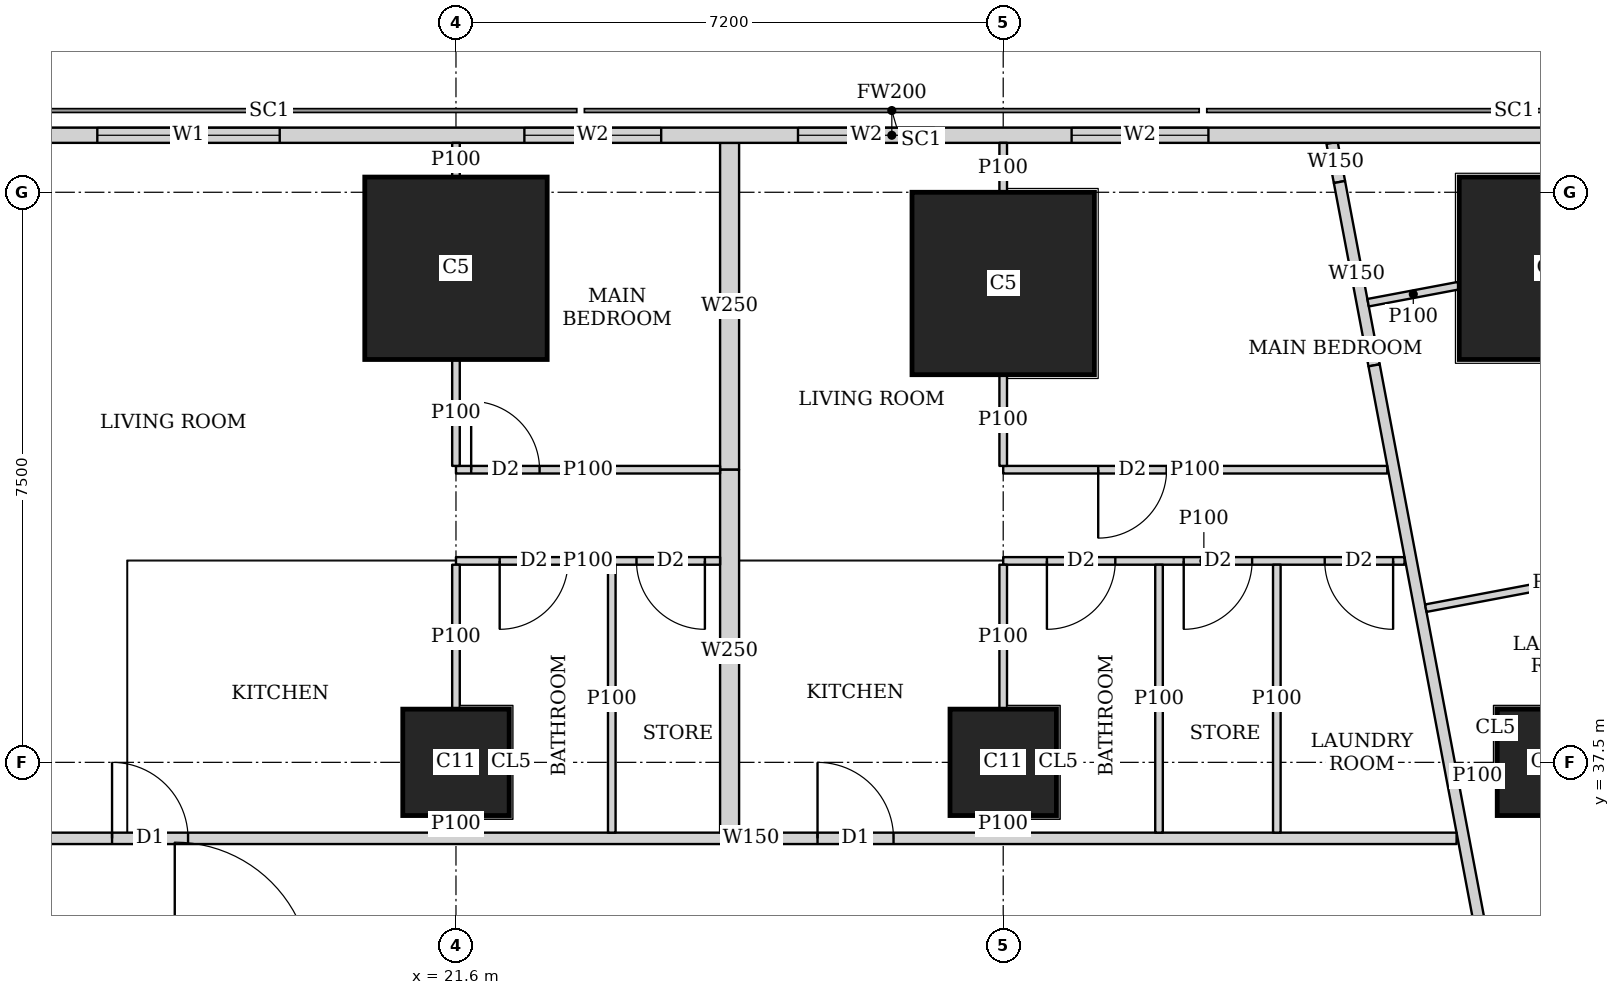
"""IFC4 building model, lengths in metres.
Left out: names, types, materials, properties, quantities, classifications, styles, units other than length and angle.
Written with IfcOpenShell. Run it as: python <this file> out.ifc"""

import sys

from ifc_helpers import new_model, si_unit, direction, frame, frame_2d, origin, origin_2d, place, context, subcontext, project, spatial, rectangle, extrude, element, fill, save


model = new_model("IFC4")
c1 = context("Model", 3, precision=1e-05, world=origin(), true_north=direction((0.0, 1.0)))
c2 = subcontext(c1, "Body", "Model", "MODEL_VIEW")
j1 = project(units=[si_unit("LENGTHUNIT", "METRE"), si_unit("PLANEANGLEUNIT", "RADIAN")], contexts=[c1])
p1 = place(None, origin())
s1 = spatial("IfcSite", under=j1, at=p1, CompositionType="ELEMENT")
p2 = place(p1, origin())
s2 = spatial("IfcBuilding", under=s1, at=p2, CompositionType="ELEMENT")
p3 = place(p2, frame((0.0, 0.0, 227.45)))
s3 = spatial("IfcBuildingStorey", under=s2, at=p3, CompositionType="ELEMENT", Elevation=227.45)
for number, where, z_axis, x_axis in (
    (1, (21.6, 37.5, 0.0), (0.0, 0.0, 1.0), (1.0, 0.0, 0.0)),
    (2, (28.8, 37.5, 0.0), (0.0, 0.0, 1.0), (1.0, 0.0, 0.0)),
    (3, (36.0, 37.5, 0.0), (0.0, 0.0, 1.0), (1.0, 0.0, 0.0)),
):
    element("IfcColumn", number, at=place(p3, frame(where, z_axis=z_axis, x_axis=x_axis)), inside=s3, PredefinedType="COLUMN", context=c2, shape_type="SweptSolid", body=[
        extrude(rectangle(XDim=1.4, YDim=1.4, at=origin_2d()), origin(), (0.0, 0.0, 1.0), 3.75),
    ])
for number, where, z_axis, x_axis in (
    (4, (21.6, 44.0, 0.0), (0.0, 0.0, 1.0), (1.0, 0.0, 0.0)),
    (5, (28.8, 43.8, 0.0), (0.0, 0.0, 1.0), (1.0, 0.0, 0.0)),
    (6, (36.0, 44.0, 0.0), (0.0, 0.0, 1.0), (1.0, 0.0, 0.0)),
):
    element("IfcColumn", number, at=place(p3, frame(where, z_axis=z_axis, x_axis=x_axis)), inside=s3, PredefinedType="COLUMN", context=c2, shape_type="SweptSolid", body=[
        extrude(rectangle(XDim=2.4, YDim=2.4, at=origin_2d()), origin(), (0.0, 0.0, 1.0), 3.75),
    ])
p4 = place(p3, frame((40.106, 45.75, 0.0), z_axis=(0.0, 0.0, 1.0), x_axis=(-1.0, 0.0, 0.0)))
e7 = element("IfcWall", 7, at=p4, inside=s3, PredefinedType="SOLIDWALL", context=c2, shape_type="SweptSolid", body=[
    extrude(rectangle(XDim=25.543, YDim=0.2, at=frame_2d((12.771, 0.0))), origin(), (0.0, 0.0, 1.0), 3.5),
])
p5 = place(p4, frame((8.606, 0.0, 0.9)))
e8 = element("IfcOpeningElement", 8, at=p5, cuts=e7, PredefinedType="OPENING", context=c2, shape_type="SweptSolid", body=[
    extrude(rectangle(XDim=1.8, YDim=1.5, at=frame_2d((0.9, 0.75))), frame((0.0, 0.11, 0.0), z_axis=(0.0, -1.0, 0.0), x_axis=(1.0, 0.0, 0.0)), (0.0, 0.0, 1.0), 0.22),
])
p6 = place(p4, frame((12.206, 0.0, 0.9)))
e9 = element("IfcOpeningElement", 9, at=p6, cuts=e7, PredefinedType="OPENING", context=c2, shape_type="SweptSolid", body=[
    extrude(rectangle(XDim=1.8, YDim=1.5, at=frame_2d((0.9, 0.75))), frame((0.0, 0.11, 0.0), z_axis=(0.0, -1.0, 0.0), x_axis=(1.0, 0.0, 0.0)), (0.0, 0.0, 1.0), 0.22),
])
p7 = place(p4, frame((15.806, 0.0, 0.9)))
e10 = element("IfcOpeningElement", 10, at=p7, cuts=e7, PredefinedType="OPENING", context=c2, shape_type="SweptSolid", body=[
    extrude(rectangle(XDim=1.8, YDim=1.5, at=frame_2d((0.9, 0.75))), frame((0.0, 0.11, 0.0), z_axis=(0.0, -1.0, 0.0), x_axis=(1.0, 0.0, 0.0)), (0.0, 0.0, 1.0), 0.22),
])
p8 = place(p4, frame((20.825, 0.0, 0.9)))
e11 = element("IfcOpeningElement", 11, at=p8, cuts=e7, PredefinedType="OPENING", context=c2, shape_type="SweptSolid", body=[
    extrude(rectangle(XDim=2.4, YDim=1.5, at=frame_2d((1.2, 0.75))), frame((0.0, 0.11, 0.0), z_axis=(0.0, -1.0, 0.0), x_axis=(1.0, 0.0, 0.0)), (0.0, 0.0, 1.0), 0.22),
])
p9 = place(p3, frame((16.201, 36.5, 0.0), z_axis=(0.0, 0.0, 1.0), x_axis=(1.0, 0.0, 0.0)))
e12 = element("IfcWall", 12, at=p9, inside=s3, PredefinedType="SOLIDWALL", context=c2, shape_type="SweptSolid", body=[
    extrude(rectangle(XDim=18.564, YDim=0.15, at=frame_2d((9.282, 0.0))), origin(), (0.0, 0.0, 1.0), 3.5),
])
p10 = place(p9, frame((0.874, 0.0, 0.0)))
e13 = element("IfcOpeningElement", 13, at=p10, cuts=e12, PredefinedType="OPENING", context=c2, shape_type="SweptSolid", body=[
    extrude(rectangle(XDim=1.0, YDim=2.1, at=frame_2d((0.5, 1.05))), frame((0.0, 0.085, 0.0), z_axis=(0.0, -1.0, 0.0), x_axis=(1.0, 0.0, 0.0)), (0.0, 0.0, 1.0), 0.17),
])
p11 = place(p9, frame((10.156, 0.0, 0.0)))
e14 = element("IfcOpeningElement", 14, at=p11, cuts=e12, PredefinedType="OPENING", context=c2, shape_type="SweptSolid", body=[
    extrude(rectangle(XDim=1.0, YDim=2.1, at=frame_2d((0.5, 1.05))), frame((0.0, 0.085, 0.0), z_axis=(0.0, -1.0, 0.0), x_axis=(1.0, 0.0, 0.0)), (0.0, 0.0, 1.0), 0.17),
])
p12 = place(p3, frame((33.127, 45.65, 0.0), z_axis=(0.0, 0.0, 1.0), x_axis=(0.185441815104, -0.982655246366, 0.0)))
e15 = element("IfcWall", 15, at=p12, inside=s3, PredefinedType="SOLIDWALL", context=c2, shape_type="SweptSolid", body=[
    extrude(rectangle(XDim=0.524, YDim=0.15, at=frame_2d((0.262, 0.0))), origin(), (0.0, 0.0, 1.0), 3.5),
])
p13 = place(p3, frame((33.224, 45.135, 0.0), z_axis=(0.0, 0.0, 1.0), x_axis=(0.185681462868, -0.982609990967, 0.0)))
e16 = element("IfcWall", 16, at=p13, inside=s3, PredefinedType="SOLIDWALL", context=c2, shape_type="SweptSolid", body=[
    extrude(rectangle(XDim=2.455, YDim=0.15, at=frame_2d((1.228, 0.0))), origin(), (0.0, 0.0, 1.0), 2.05),
])
p14 = place(p3, frame((33.68, 42.723, 0.0), z_axis=(0.0, 0.0, 1.0), x_axis=(0.185601160014, -0.982625162207, 0.0)))
e17 = element("IfcWall", 17, at=p14, inside=s3, PredefinedType="SOLIDWALL", context=c2, shape_type="SweptSolid", body=[
    extrude(rectangle(XDim=41.051, YDim=0.15, at=frame_2d((20.526, 0.0))), origin(), (0.0, 0.0, 1.0), 2.5),
])
p15 = place(p14, frame((16.123, 0.0, 0.0)))
e18 = element("IfcOpeningElement", 18, at=p15, cuts=e17, PredefinedType="OPENING", context=c2, shape_type="SweptSolid", body=[
    extrude(rectangle(XDim=1.0, YDim=2.1, at=frame_2d((0.5, 1.05))), frame((0.0, 0.085, 0.0), z_axis=(0.0, -1.0, 0.0), x_axis=(1.0, 0.0, 0.0)), (0.0, 0.0, 1.0), 0.17),
])
p16 = place(p14, frame((19.938, 0.0, 0.0)))
e19 = element("IfcOpeningElement", 19, at=p16, cuts=e17, PredefinedType="OPENING", context=c2, shape_type="SweptSolid", body=[
    extrude(rectangle(XDim=1.0, YDim=2.1, at=frame_2d((0.5, 1.05))), frame((0.0, 0.085, 0.0), z_axis=(0.0, -1.0, 0.0), x_axis=(1.0, 0.0, 0.0)), (0.0, 0.0, 1.0), 0.17),
])
p17 = place(p14, frame((30.902, 0.0, 0.0)))
e20 = element("IfcOpeningElement", 20, at=p17, cuts=e17, PredefinedType="OPENING", context=c2, shape_type="SweptSolid", body=[
    extrude(rectangle(XDim=1.0, YDim=2.1, at=frame_2d((0.5, 1.05))), frame((0.0, 0.085, 0.0), z_axis=(0.0, -1.0, 0.0), x_axis=(1.0, 0.0, 0.0)), (0.0, 0.0, 1.0), 0.17),
])
p18 = place(p3, frame((34.79, 43.771, 0.0), z_axis=(0.0, 0.0, 1.0), x_axis=(-0.982730261052, -0.18504387051, 0.0)))
e21 = element("IfcWall", 21, at=p18, inside=s3, PredefinedType="PARTITIONING", context=c2, shape_type="SweptSolid", body=[
    extrude(rectangle(XDim=1.21, YDim=0.1, at=frame_2d((0.605, 0.0))), origin(), (0.0, 0.0, 1.0), 2.05),
])
p19 = place(p3, frame((37.824, 40.182, 0.0), z_axis=(0.0, 0.0, 1.0), x_axis=(-0.982648794755, -0.185475998897, 0.0)))
e22 = element("IfcWall", 22, at=p19, inside=s3, PredefinedType="PARTITIONING", context=c2, shape_type="SweptSolid", body=[
    extrude(rectangle(XDim=3.525, YDim=0.1, at=frame_2d((1.763, 0.0))), origin(), (0.0, 0.0, 1.0), 3.5),
])
p20 = place(p3, frame((35.29, 37.366, 0.0), z_axis=(0.0, 0.0, 1.0), x_axis=(-0.982715597703, -0.185121727606, 0.0)))
e23 = element("IfcWall", 23, at=p20, inside=s3, PredefinedType="PARTITIONING", context=c2, shape_type="SweptSolid", body=[
    extrude(rectangle(XDim=0.513, YDim=0.1, at=frame_2d((0.256, 0.0))), origin(), (0.0, 0.0, 1.0), 3.5),
])
p21 = place(p3, frame((21.6, 41.35, 0.0), z_axis=(0.0, 0.0, 1.0), x_axis=(1.0, 0.0, 0.0)))
e24 = element("IfcWall", 24, at=p21, inside=s3, PredefinedType="PARTITIONING", context=c2, shape_type="SweptSolid", body=[
    extrude(rectangle(XDim=3.475, YDim=0.1, at=frame_2d((1.737, 0.0))), origin(), (0.0, 0.0, 1.0), 3.5),
])
p22 = place(p21, frame((0.2, 0.0, 0.0)))
e25 = element("IfcOpeningElement", 25, at=p22, cuts=e24, PredefinedType="OPENING", context=c2, shape_type="SweptSolid", body=[
    extrude(rectangle(XDim=0.9, YDim=2.1, at=frame_2d((0.45, 1.05))), frame((0.0, 0.06, 0.0), z_axis=(0.0, -1.0, 0.0), x_axis=(1.0, 0.0, 0.0)), (0.0, 0.0, 1.0), 0.12),
])
p23 = place(p3, frame((21.6, 40.15, 0.0), z_axis=(0.0, 0.0, 1.0), x_axis=(1.0, 0.0, 0.0)))
e26 = element("IfcWall", 26, at=p23, inside=s3, PredefinedType="PARTITIONING", context=c2, shape_type="SweptSolid", body=[
    extrude(rectangle(XDim=3.475, YDim=0.1, at=frame_2d((1.737, 0.0))), origin(), (0.0, 0.0, 1.0), 3.5),
])
p24 = place(p23, frame((0.575, 0.0, 0.0)))
e27 = element("IfcOpeningElement", 27, at=p24, cuts=e26, PredefinedType="OPENING", context=c2, shape_type="SweptSolid", body=[
    extrude(rectangle(XDim=0.9, YDim=2.1, at=frame_2d((0.45, 1.05))), frame((0.0, 0.06, 0.0), z_axis=(0.0, -1.0, 0.0), x_axis=(1.0, 0.0, 0.0)), (0.0, 0.0, 1.0), 0.12),
])
p25 = place(p23, frame((2.375, 0.0, 0.0)))
e28 = element("IfcOpeningElement", 28, at=p25, cuts=e26, PredefinedType="OPENING", context=c2, shape_type="SweptSolid", body=[
    extrude(rectangle(XDim=0.9, YDim=2.1, at=frame_2d((0.45, 1.05))), frame((0.0, 0.06, 0.0), z_axis=(0.0, -1.0, 0.0), x_axis=(1.0, 0.0, 0.0)), (0.0, 0.0, 1.0), 0.12),
])
p26 = place(p3, frame((21.6, 41.4, 0.0), z_axis=(0.0, 0.0, 1.0), x_axis=(0.0, 1.0, 0.0)))
e29 = element("IfcWall", 29, at=p26, inside=s3, PredefinedType="PARTITIONING", context=c2, shape_type="SweptSolid", body=[
    extrude(rectangle(XDim=1.399, YDim=0.1, at=frame_2d((0.7, 0.0))), origin(), (0.0, 0.0, 1.0), 3.5),
])
p27 = place(p3, frame((21.6, 45.201, 0.0), z_axis=(0.0, 0.0, 1.0), x_axis=(0.0, 1.0, 0.0)))
e30 = element("IfcWall", 30, at=p27, inside=s3, PredefinedType="PARTITIONING", context=c2, shape_type="SweptSolid", body=[
    extrude(rectangle(XDim=0.449, YDim=0.1, at=frame_2d((0.225, 0.0))), origin(), (0.0, 0.0, 1.0), 3.5),
])
p28 = place(p3, frame((21.6, 36.575, 0.0), z_axis=(0.0, 0.0, 1.0), x_axis=(0.0, 1.0, 0.0)))
e31 = element("IfcWall", 31, at=p28, inside=s3, PredefinedType="PARTITIONING", context=c2, shape_type="SweptSolid", body=[
    extrude(rectangle(XDim=0.224, YDim=0.1, at=frame_2d((0.112, 0.0))), origin(), (0.0, 0.0, 1.0), 3.5),
])
p29 = place(p3, frame((21.6, 38.201, 0.0), z_axis=(0.0, 0.0, 1.0), x_axis=(0.0, 1.0, 0.0)))
e32 = element("IfcWall", 32, at=p29, inside=s3, PredefinedType="PARTITIONING", context=c2, shape_type="SweptSolid", body=[
    extrude(rectangle(XDim=1.899, YDim=0.1, at=frame_2d((0.95, 0.0))), origin(), (0.0, 0.0, 1.0), 3.5),
])
p30 = place(p3, frame((23.65, 36.575, 0.0), z_axis=(0.0, 0.0, 1.0), x_axis=(0.0, 1.0, 0.0)))
e33 = element("IfcWall", 33, at=p30, inside=s3, PredefinedType="PARTITIONING", context=c2, shape_type="SweptSolid", body=[
    extrude(rectangle(XDim=3.525, YDim=0.1, at=frame_2d((1.763, 0.0))), origin(), (0.0, 0.0, 1.0), 3.5),
])
p31 = place(p3, frame((28.8, 41.35, 0.0), z_axis=(0.0, 0.0, 1.0), x_axis=(1.0, 0.0, 0.0)))
e34 = element("IfcWall", 34, at=p31, inside=s3, PredefinedType="PARTITIONING", context=c2, shape_type="SweptSolid", body=[
    extrude(rectangle(XDim=5.053, YDim=0.1, at=frame_2d((2.526, 0.0))), origin(), (0.0, 0.0, 1.0), 3.5),
])
p32 = place(p31, frame((1.25, 0.0, 0.0)))
e35 = element("IfcOpeningElement", 35, at=p32, cuts=e34, PredefinedType="OPENING", context=c2, shape_type="SweptSolid", body=[
    extrude(rectangle(XDim=0.9, YDim=2.1, at=frame_2d((0.45, 1.05))), frame((0.0, 0.06, 0.0), z_axis=(0.0, -1.0, 0.0), x_axis=(1.0, 0.0, 0.0)), (0.0, 0.0, 1.0), 0.12),
])
p33 = place(p3, frame((28.8, 40.15, 0.0), z_axis=(0.0, 0.0, 1.0), x_axis=(1.0, 0.0, 0.0)))
e36 = element("IfcWall", 36, at=p33, inside=s3, PredefinedType="PARTITIONING", context=c2, shape_type="SweptSolid", body=[
    extrude(rectangle(XDim=5.28, YDim=0.1, at=frame_2d((2.64, 0.0))), origin(), (0.0, 0.0, 1.0), 3.5),
])
p34 = place(p33, frame((0.575, 0.0, 0.0)))
e37 = element("IfcOpeningElement", 37, at=p34, cuts=e36, PredefinedType="OPENING", context=c2, shape_type="SweptSolid", body=[
    extrude(rectangle(XDim=0.9, YDim=2.1, at=frame_2d((0.45, 1.05))), frame((0.0, 0.06, 0.0), z_axis=(0.0, -1.0, 0.0), x_axis=(1.0, 0.0, 0.0)), (0.0, 0.0, 1.0), 0.12),
])
p35 = place(p33, frame((4.23, 0.0, 0.0)))
e38 = element("IfcOpeningElement", 38, at=p35, cuts=e36, PredefinedType="OPENING", context=c2, shape_type="SweptSolid", body=[
    extrude(rectangle(XDim=0.9, YDim=2.1, at=frame_2d((0.45, 1.05))), frame((0.0, 0.06, 0.0), z_axis=(0.0, -1.0, 0.0), x_axis=(1.0, 0.0, 0.0)), (0.0, 0.0, 1.0), 0.12),
])
p36 = place(p33, frame((2.375, 0.0, 0.0)))
e39 = element("IfcOpeningElement", 39, at=p36, cuts=e36, PredefinedType="OPENING", context=c2, shape_type="SweptSolid", body=[
    extrude(rectangle(XDim=0.9, YDim=2.1, at=frame_2d((0.45, 1.05))), frame((0.0, 0.06, 0.0), z_axis=(0.0, -1.0, 0.0), x_axis=(1.0, 0.0, 0.0)), (0.0, 0.0, 1.0), 0.12),
])
p37 = place(p3, frame((28.8, 41.4, 0.0), z_axis=(0.0, 0.0, 1.0), x_axis=(0.0, 1.0, 0.0)))
e40 = element("IfcWall", 40, at=p37, inside=s3, PredefinedType="PARTITIONING", context=c2, shape_type="SweptSolid", body=[
    extrude(rectangle(XDim=1.199, YDim=0.1, at=frame_2d((0.6, 0.0))), origin(), (0.0, 0.0, 1.0), 3.5),
])
p38 = place(p3, frame((28.8, 45.001, 0.0), z_axis=(0.0, 0.0, 1.0), x_axis=(0.0, 1.0, 0.0)))
e41 = element("IfcWall", 41, at=p38, inside=s3, PredefinedType="PARTITIONING", context=c2, shape_type="SweptSolid", body=[
    extrude(rectangle(XDim=0.649, YDim=0.1, at=frame_2d((0.324, 0.0))), origin(), (0.0, 0.0, 1.0), 3.5),
])
p39 = place(p3, frame((28.8, 36.575, 0.0), z_axis=(0.0, 0.0, 1.0), x_axis=(0.0, 1.0, 0.0)))
e42 = element("IfcWall", 42, at=p39, inside=s3, PredefinedType="PARTITIONING", context=c2, shape_type="SweptSolid", body=[
    extrude(rectangle(XDim=0.224, YDim=0.1, at=frame_2d((0.112, 0.0))), origin(), (0.0, 0.0, 1.0), 3.5),
])
p40 = place(p3, frame((28.8, 38.201, 0.0), z_axis=(0.0, 0.0, 1.0), x_axis=(0.0, 1.0, 0.0)))
e43 = element("IfcWall", 43, at=p40, inside=s3, PredefinedType="PARTITIONING", context=c2, shape_type="SweptSolid", body=[
    extrude(rectangle(XDim=1.899, YDim=0.1, at=frame_2d((0.95, 0.0))), origin(), (0.0, 0.0, 1.0), 3.5),
])
for number, where, z_axis, x_axis in (
    (44, (32.4, 36.575, 0.0), (0.0, 0.0, 1.0), (0.0, 1.0, 0.0)),
    (45, (30.85, 36.575, 0.0), (0.0, 0.0, 1.0), (0.0, 1.0, 0.0)),
):
    element("IfcWall", number, at=place(p3, frame(where, z_axis=z_axis, x_axis=x_axis)), inside=s3, PredefinedType="PARTITIONING", context=c2, shape_type="SweptSolid", body=[
        extrude(rectangle(XDim=3.525, YDim=0.1, at=frame_2d((1.763, 0.0))), origin(), (0.0, 0.0, 1.0), 3.5),
    ])
p41 = place(p3, frame((25.2, 41.35, 0.0), z_axis=(0.0, 0.0, 1.0), x_axis=(0.0, 1.0, 0.0)))
e46 = element("IfcWall", 46, at=p41, inside=s3, PredefinedType="SOLIDWALL", context=c2, shape_type="SweptSolid", body=[
    extrude(rectangle(XDim=4.3, YDim=0.25, at=frame_2d((2.15, 0.0))), origin(), (0.0, 0.0, 1.0), 2.05),
])
p42 = place(p3, frame((25.2, 36.575, 0.0), z_axis=(0.0, 0.0, 1.0), x_axis=(0.0, 1.0, 0.0)))
e47 = element("IfcWall", 47, at=p42, inside=s3, PredefinedType="SOLIDWALL", context=c2, shape_type="SweptSolid", body=[
    extrude(rectangle(XDim=4.775, YDim=0.25, at=frame_2d((2.388, 0.0))), origin(), (0.0, 0.0, 1.0), 3.5),
])
p43 = place(p5, origin())
e48 = element("IfcWindow", 48, at=p43, inside=s3, PartitioningType="SINGLE_PANEL", PredefinedType="WINDOW", context=c2, shape_type="SweptSolid", body=[
    extrude(rectangle(XDim=1.8, YDim=1.5, at=frame_2d((0.9, 0.75))), frame((0.0, 0.03, 0.0), z_axis=(0.0, -1.0, 0.0), x_axis=(1.0, 0.0, 0.0)), (0.0, 0.0, 1.0), 0.06),
])
fill(e8, e48)
p44 = place(p6, origin())
e49 = element("IfcWindow", 49, at=p44, inside=s3, PartitioningType="SINGLE_PANEL", PredefinedType="WINDOW", context=c2, shape_type="SweptSolid", body=[
    extrude(rectangle(XDim=1.8, YDim=1.5, at=frame_2d((0.9, 0.75))), frame((0.0, 0.03, 0.0), z_axis=(0.0, -1.0, 0.0), x_axis=(1.0, 0.0, 0.0)), (0.0, 0.0, 1.0), 0.06),
])
fill(e9, e49)
p45 = place(p7, origin())
e50 = element("IfcWindow", 50, at=p45, inside=s3, PartitioningType="SINGLE_PANEL", PredefinedType="WINDOW", context=c2, shape_type="SweptSolid", body=[
    extrude(rectangle(XDim=1.8, YDim=1.5, at=frame_2d((0.9, 0.75))), frame((0.0, 0.03, 0.0), z_axis=(0.0, -1.0, 0.0), x_axis=(1.0, 0.0, 0.0)), (0.0, 0.0, 1.0), 0.06),
])
fill(e10, e50)
p46 = place(p8, origin())
e51 = element("IfcWindow", 51, at=p46, inside=s3, PartitioningType="SINGLE_PANEL", PredefinedType="WINDOW", context=c2, shape_type="SweptSolid", body=[
    extrude(rectangle(XDim=2.4, YDim=1.5, at=frame_2d((1.2, 0.75))), frame((0.0, 0.03, 0.0), z_axis=(0.0, -1.0, 0.0), x_axis=(1.0, 0.0, 0.0)), (0.0, 0.0, 1.0), 0.06),
])
fill(e11, e51)
p47 = place(p22, origin())
e52 = element("IfcDoor", 52, at=p47, inside=s3, OperationType="SINGLE_SWING_LEFT", PredefinedType="DOOR", context=c2, shape_type="SweptSolid", body=[
    extrude(rectangle(XDim=0.9, YDim=2.1, at=frame_2d((0.45, 1.05))), frame((0.0, 0.025, 0.0), z_axis=(0.0, -1.0, 0.0), x_axis=(1.0, 0.0, 0.0)), (0.0, 0.0, 1.0), 0.05),
])
fill(e25, e52)
p48 = place(p24, origin())
e53 = element("IfcDoor", 53, at=p48, inside=s3, OperationType="SINGLE_SWING_RIGHT", PredefinedType="DOOR", context=c2, shape_type="SweptSolid", body=[
    extrude(rectangle(XDim=0.9, YDim=2.1, at=frame_2d((0.45, 1.05))), frame((0.0, 0.025, 0.0), z_axis=(0.0, -1.0, 0.0), x_axis=(1.0, 0.0, 0.0)), (0.0, 0.0, 1.0), 0.05),
])
fill(e27, e53)
p49 = place(p25, origin())
e54 = element("IfcDoor", 54, at=p49, inside=s3, OperationType="SINGLE_SWING_LEFT", PredefinedType="DOOR", context=c2, shape_type="SweptSolid", body=[
    extrude(rectangle(XDim=0.9, YDim=2.1, at=frame_2d((0.45, 1.05))), frame((0.0, 0.025, 0.0), z_axis=(0.0, -1.0, 0.0), x_axis=(1.0, 0.0, 0.0)), (0.0, 0.0, 1.0), 0.05),
])
fill(e28, e54)
p50 = place(p10, origin())
e55 = element("IfcDoor", 55, at=p50, inside=s3, OperationType="SINGLE_SWING_LEFT", PredefinedType="DOOR", context=c2, shape_type="SweptSolid", body=[
    extrude(rectangle(XDim=1.0, YDim=2.1, at=frame_2d((0.5, 1.05))), frame((0.0, 0.025, 0.0), z_axis=(0.0, -1.0, 0.0), x_axis=(1.0, 0.0, 0.0)), (0.0, 0.0, 1.0), 0.05),
])
fill(e13, e55)
p51 = place(p32, origin())
e56 = element("IfcDoor", 56, at=p51, inside=s3, OperationType="SINGLE_SWING_RIGHT", PredefinedType="DOOR", context=c2, shape_type="SweptSolid", body=[
    extrude(rectangle(XDim=0.9, YDim=2.1, at=frame_2d((0.45, 1.05))), frame((0.0, 0.025, 0.0), z_axis=(0.0, -1.0, 0.0), x_axis=(1.0, 0.0, 0.0)), (0.0, 0.0, 1.0), 0.05),
])
fill(e35, e56)
p52 = place(p34, origin())
e57 = element("IfcDoor", 57, at=p52, inside=s3, OperationType="SINGLE_SWING_RIGHT", PredefinedType="DOOR", context=c2, shape_type="SweptSolid", body=[
    extrude(rectangle(XDim=0.9, YDim=2.1, at=frame_2d((0.45, 1.05))), frame((0.0, 0.025, 0.0), z_axis=(0.0, -1.0, 0.0), x_axis=(1.0, 0.0, 0.0)), (0.0, 0.0, 1.0), 0.05),
])
fill(e37, e57)
p53 = place(p35, origin())
e58 = element("IfcDoor", 58, at=p53, inside=s3, OperationType="SINGLE_SWING_LEFT", PredefinedType="DOOR", context=c2, shape_type="SweptSolid", body=[
    extrude(rectangle(XDim=0.9, YDim=2.1, at=frame_2d((0.45, 1.05))), frame((0.0, 0.025, 0.0), z_axis=(0.0, -1.0, 0.0), x_axis=(1.0, 0.0, 0.0)), (0.0, 0.0, 1.0), 0.05),
])
fill(e38, e58)
p54 = place(p36, origin())
e59 = element("IfcDoor", 59, at=p54, inside=s3, OperationType="SINGLE_SWING_RIGHT", PredefinedType="DOOR", context=c2, shape_type="SweptSolid", body=[
    extrude(rectangle(XDim=0.9, YDim=2.1, at=frame_2d((0.45, 1.05))), frame((0.0, 0.025, 0.0), z_axis=(0.0, -1.0, 0.0), x_axis=(1.0, 0.0, 0.0)), (0.0, 0.0, 1.0), 0.05),
])
fill(e39, e59)
p55 = place(p11, origin())
e60 = element("IfcDoor", 60, at=p55, inside=s3, OperationType="SINGLE_SWING_LEFT", PredefinedType="DOOR", context=c2, shape_type="SweptSolid", body=[
    extrude(rectangle(XDim=1.0, YDim=2.1, at=frame_2d((0.5, 1.05))), frame((0.0, 0.025, 0.0), z_axis=(0.0, -1.0, 0.0), x_axis=(1.0, 0.0, 0.0)), (0.0, 0.0, 1.0), 0.05),
])
fill(e14, e60)
save(model, sys.argv[1])
